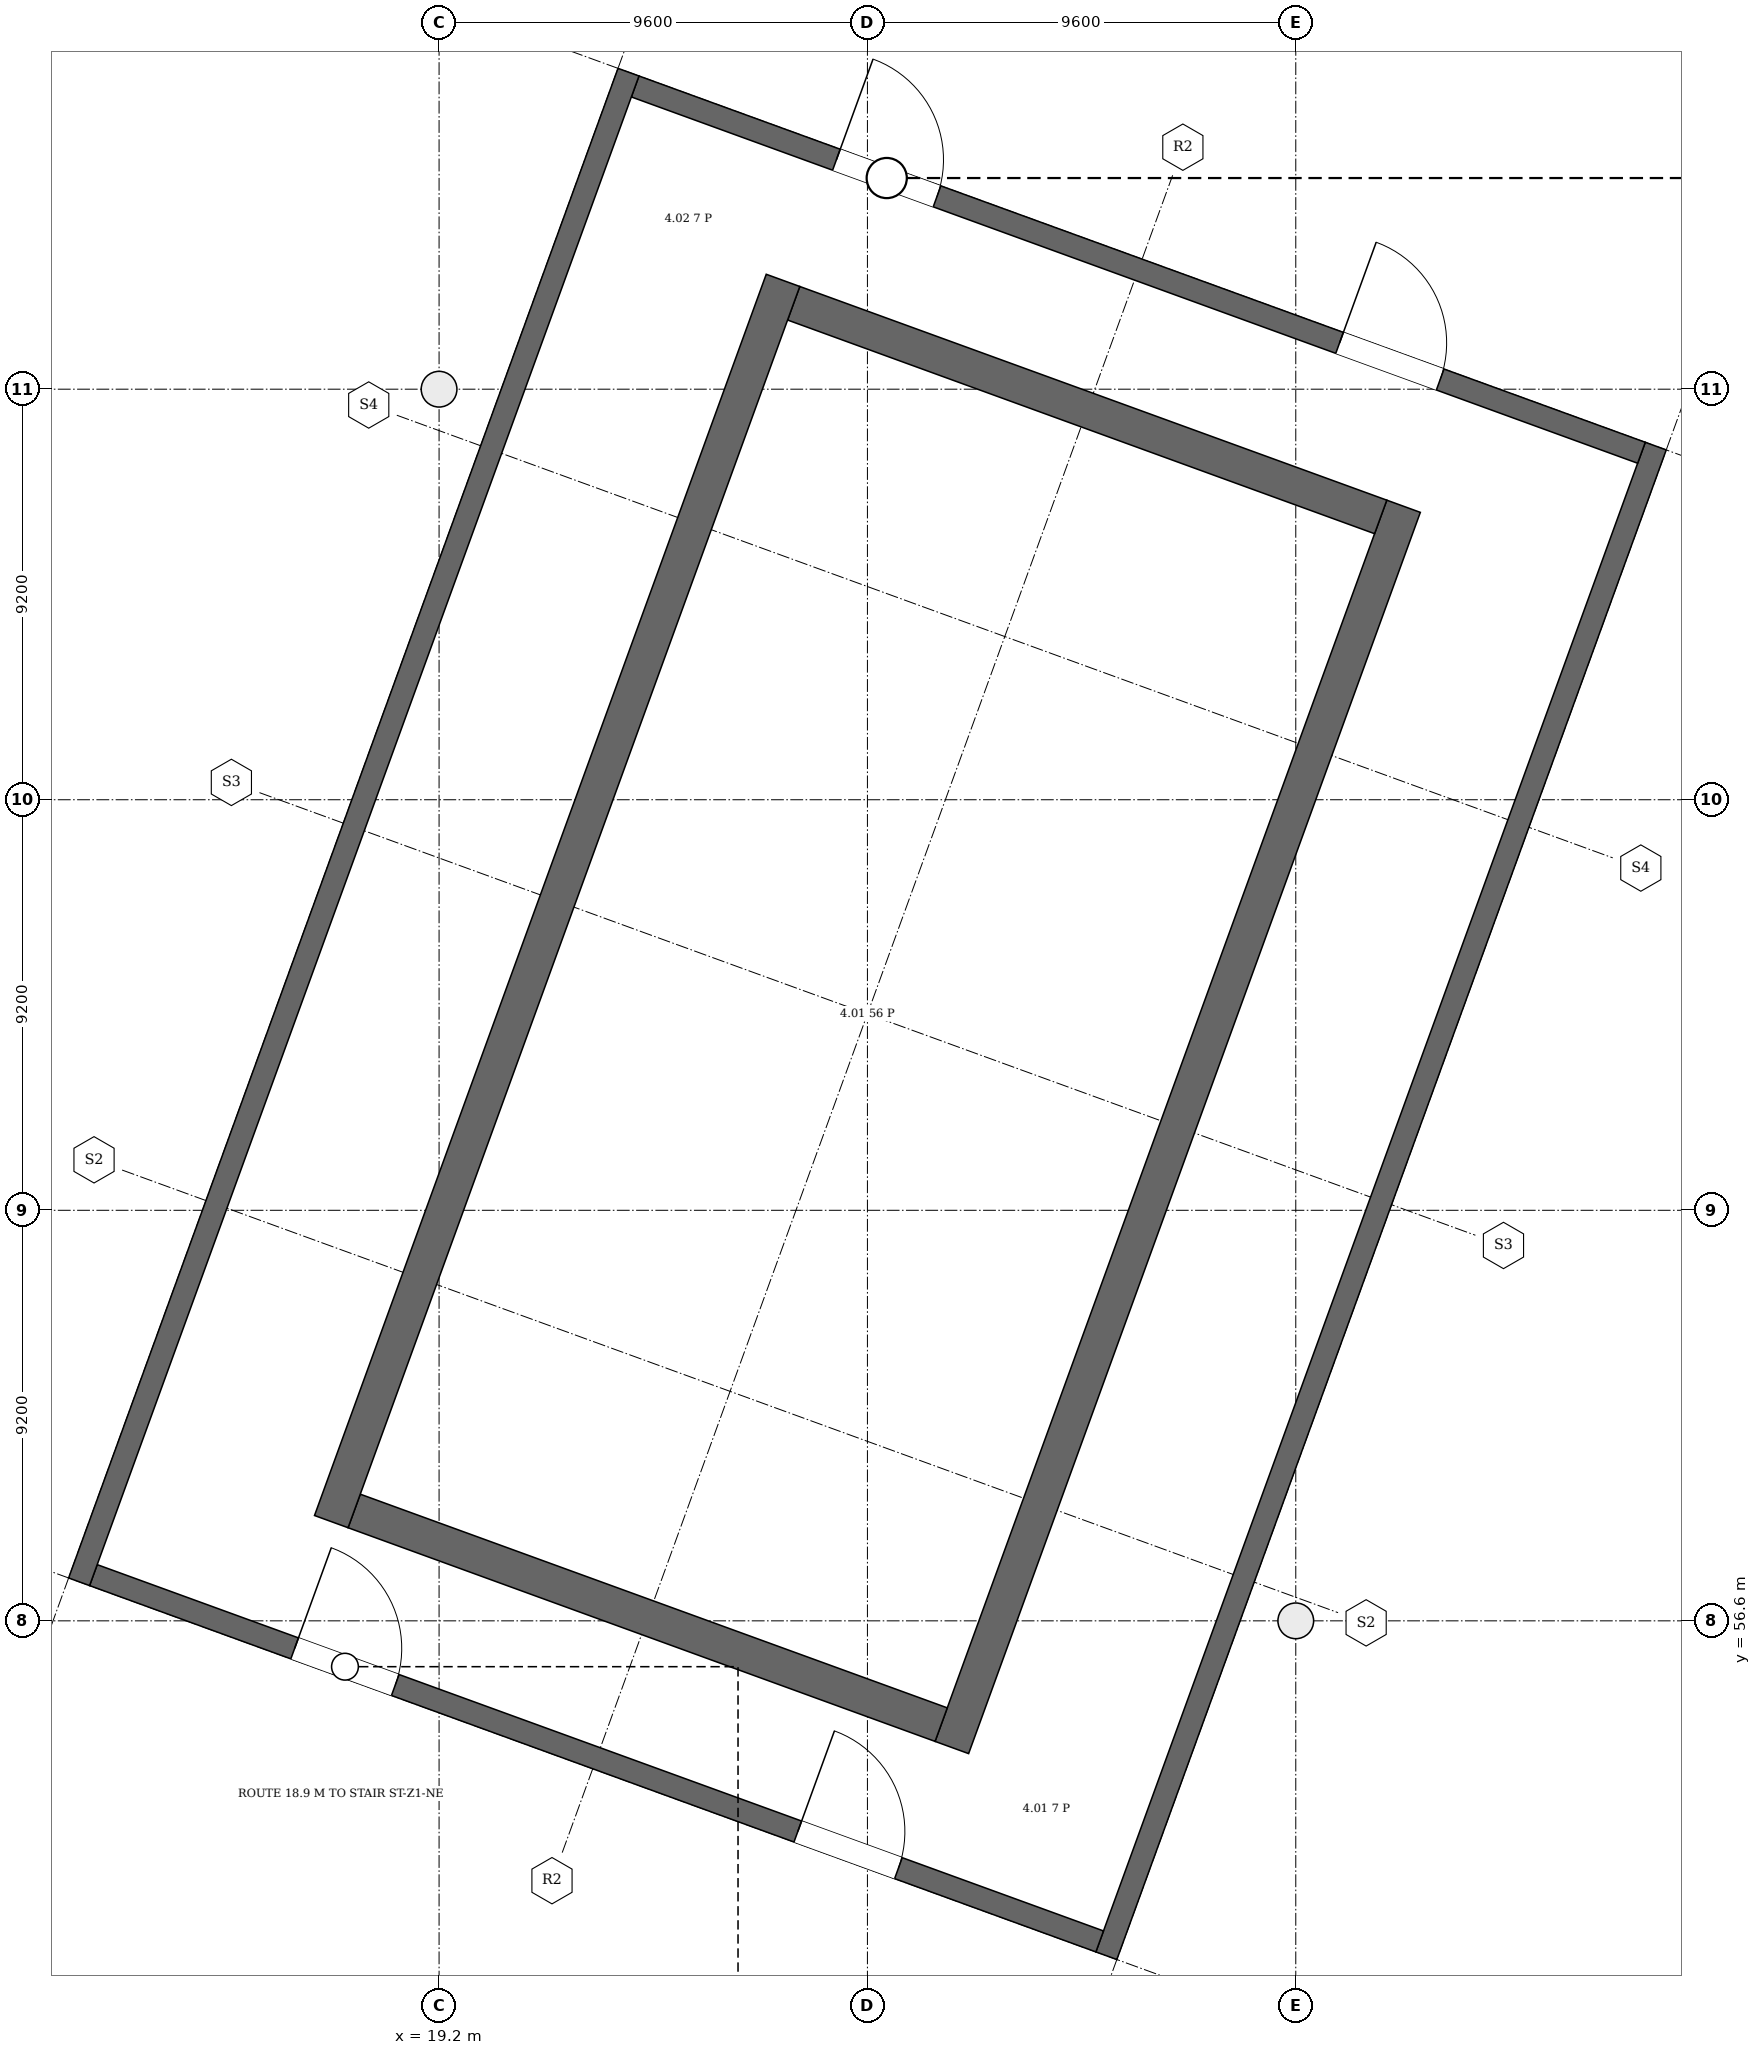
"""IFC4 building model, lengths in metres.
Left out: names, types, materials, properties, quantities, classifications, styles, units other than length and angle.
Written with IfcOpenShell. Run it as: python <this file> out.ifc"""

import sys

from ifc_helpers import new_model, si_unit, direction, frame, frame_2d, origin, origin_2d, place, context, subcontext, project, spatial, rectangle, circle, extrude, element, fill, save


model = new_model("IFC4")
c1 = context("Model", 3, precision=1e-05, world=origin(), true_north=direction((0.0, 1.0)))
c2 = subcontext(c1, "Body", "Model", "MODEL_VIEW")
j1 = project(units=[si_unit("LENGTHUNIT", "METRE"), si_unit("PLANEANGLEUNIT", "RADIAN")], contexts=[c1])
p1 = place(None, origin())
s1 = spatial("IfcSite", under=j1, at=p1, CompositionType="ELEMENT")
p2 = place(p1, origin())
s2 = spatial("IfcBuilding", under=s1, at=p2, CompositionType="ELEMENT")
p3 = place(p2, frame((0.0, 0.0, 26.7)))
s3 = spatial("IfcBuildingStorey", under=s2, at=p3, CompositionType="ELEMENT", Elevation=26.7)
p4 = place(p3, frame((11.132, 57.475, 0.0), z_axis=(0.0, 0.0, 1.0), x_axis=(0.342021295667, 0.939692201367, 0.0)))
e1 = element("IfcWall", 1, at=p4, inside=s3, PredefinedType="SHEAR", context=c2, shape_type="SweptSolid", body=[
    extrude(rectangle(XDim=36.0, YDim=0.5, at=frame_2d((18.0, 0.0))), origin(), (0.0, 0.0, 1.0), 5.2),
])
p5 = place(p3, frame((34.155, 49.096, 0.0), z_axis=(0.0, 0.0, 1.0), x_axis=(0.342019116079, 0.939692994673, 0.0)))
e2 = element("IfcWall", 2, at=p5, inside=s3, PredefinedType="SHEAR", context=c2, shape_type="SweptSolid", body=[
    extrude(rectangle(XDim=36.0, YDim=0.5, at=frame_2d((18.0, 0.0))), origin(), (0.0, 0.0, 1.0), 5.2),
])
p6 = place(p3, frame((11.453, 57.625, 0.0), z_axis=(0.0, 0.0, 1.0), x_axis=(0.939691804709, -0.342022385471, 0.0)))
e3 = element("IfcWall", 3, at=p6, inside=s3, PredefinedType="SHEAR", context=c2, shape_type="SweptSolid", body=[
    extrude(rectangle(XDim=24.0, YDim=0.5, at=frame_2d((12.0, 0.0))), origin(), (0.0, 0.0, 1.0), 5.2),
])
p7 = place(p6, frame((4.8, 0.0, 0.0)))
e4 = element("IfcOpeningElement", 4, at=p7, cuts=e3, PredefinedType="OPENING", context=c2, shape_type="SweptSolid", body=[
    extrude(rectangle(XDim=2.4, YDim=2.4, at=frame_2d((1.2, 1.2))), frame((0.0, 0.26, 0.0), z_axis=(0.0, -1.0, 0.0), x_axis=(1.0, 0.0, 0.0)), (0.0, 0.0, 1.0), 0.52),
])
p8 = place(p6, frame((16.8, 0.0, 0.0)))
e5 = element("IfcOpeningElement", 5, at=p8, cuts=e3, PredefinedType="OPENING", context=c2, shape_type="SweptSolid", body=[
    extrude(rectangle(XDim=2.4, YDim=2.4, at=frame_2d((1.2, 1.2))), frame((0.0, 0.26, 0.0), z_axis=(0.0, -1.0, 0.0), x_axis=(1.0, 0.0, 0.0)), (0.0, 0.0, 1.0), 0.52),
])
p9 = place(p3, frame((23.594, 90.984, 0.0), z_axis=(0.0, 0.0, 1.0), x_axis=(0.939692994673, -0.342019116079, 0.0)))
e6 = element("IfcWall", 6, at=p9, inside=s3, PredefinedType="SHEAR", context=c2, shape_type="SweptSolid", body=[
    extrude(rectangle(XDim=24.0, YDim=0.5, at=frame_2d((12.0, 0.0))), origin(), (0.0, 0.0, 1.0), 5.2),
])
p10 = place(p9, frame((4.8, 0.0, 0.0)))
e7 = element("IfcOpeningElement", 7, at=p10, cuts=e6, PredefinedType="OPENING", context=c2, shape_type="SweptSolid", body=[
    extrude(rectangle(XDim=2.4, YDim=2.4, at=frame_2d((1.2, 1.2))), frame((0.0, 0.26, 0.0), z_axis=(0.0, -1.0, 0.0), x_axis=(1.0, 0.0, 0.0)), (0.0, 0.0, 1.0), 0.52),
])
p11 = place(p9, frame((16.8, 0.0, 0.0)))
e8 = element("IfcOpeningElement", 8, at=p11, cuts=e6, PredefinedType="OPENING", context=c2, shape_type="SweptSolid", body=[
    extrude(rectangle(XDim=2.4, YDim=2.4, at=frame_2d((1.2, 1.2))), frame((0.0, 0.26, 0.0), z_axis=(0.0, -1.0, 0.0), x_axis=(1.0, 0.0, 0.0)), (0.0, 0.0, 1.0), 0.52),
])
p12 = place(p3, frame((16.784, 58.823, 0.0), z_axis=(0.0, 0.0, 1.0), x_axis=(0.342019205328, 0.939692962188, 0.0)))
e9 = element("IfcWall", 9, at=p12, inside=s3, PredefinedType="SOLIDWALL", context=c2, shape_type="SweptSolid", body=[
    extrude(rectangle(XDim=29.6, YDim=0.8, at=frame_2d((14.8, 0.0))), origin(), (0.0, 0.0, 1.0), 1.1),
])
p13 = place(p3, frame((30.692, 53.762, 0.0), z_axis=(0.0, 0.0, 1.0), x_axis=(0.342021856193, 0.939691997352, 0.0)))
e10 = element("IfcWall", 10, at=p13, inside=s3, PredefinedType="SOLIDWALL", context=c2, shape_type="SweptSolid", body=[
    extrude(rectangle(XDim=29.6, YDim=0.8, at=frame_2d((14.8, 0.0))), origin(), (0.0, 0.0, 1.0), 1.1),
])
p14 = place(p3, frame((17.297, 59.062, 0.0), z_axis=(0.0, 0.0, 1.0), x_axis=(0.939690020578, -0.342027287253, 0.0)))
e11 = element("IfcWall", 11, at=p14, inside=s3, PredefinedType="SOLIDWALL", context=c2, shape_type="SweptSolid", body=[
    extrude(rectangle(XDim=14.0, YDim=0.8, at=frame_2d((7.0, 0.0))), origin(), (0.0, 0.0, 1.0), 1.1),
])
p15 = place(p3, frame((27.147, 86.126, 0.0), z_axis=(0.0, 0.0, 1.0), x_axis=(0.939692060566, -0.342021682513, 0.0)))
e12 = element("IfcWall", 12, at=p15, inside=s3, PredefinedType="SOLIDWALL", context=c2, shape_type="SweptSolid", body=[
    extrude(rectangle(XDim=14.0, YDim=0.8, at=frame_2d((7.0, 0.0))), origin(), (0.0, 0.0, 1.0), 1.1),
])
for number, where, z_axis, x_axis in (
    (13, (38.4, 56.6, 0.0), (0.0, 0.0, 1.0), (1.0, 0.0, 0.0)),
    (14, (19.2, 84.2, 0.0), (0.0, 0.0, 1.0), (1.0, 0.0, 0.0)),
):
    element("IfcColumn", number, at=place(p3, frame(where, z_axis=z_axis, x_axis=x_axis)), inside=s3, PredefinedType="COLUMN", context=c2, shape_type="SweptSolid", body=[
        extrude(circle(Radius=0.4, at=origin_2d()), origin(), (0.0, 0.0, 1.0), 5.2),
    ])
p16 = place(p7, origin())
e15 = element("IfcDoor", 15, at=p16, inside=s3, OperationType="DOUBLE_DOOR_SINGLE_SWING", PredefinedType="DOOR", context=c2, shape_type="SweptSolid", body=[
    extrude(rectangle(XDim=2.4, YDim=2.4, at=frame_2d((1.2, 1.2))), frame((0.0, 0.025, 0.0), z_axis=(0.0, -1.0, 0.0), x_axis=(1.0, 0.0, 0.0)), (0.0, 0.0, 1.0), 0.05),
])
fill(e4, e15)
p17 = place(p10, origin())
e16 = element("IfcDoor", 16, at=p17, inside=s3, OperationType="DOUBLE_DOOR_SINGLE_SWING", PredefinedType="DOOR", context=c2, shape_type="SweptSolid", body=[
    extrude(rectangle(XDim=2.4, YDim=2.4, at=frame_2d((1.2, 1.2))), frame((0.0, 0.025, 0.0), z_axis=(0.0, -1.0, 0.0), x_axis=(1.0, 0.0, 0.0)), (0.0, 0.0, 1.0), 0.05),
])
fill(e7, e16)
p18 = place(p8, origin())
e17 = element("IfcDoor", 17, at=p18, inside=s3, OperationType="DOUBLE_DOOR_SINGLE_SWING", PredefinedType="DOOR", context=c2, shape_type="SweptSolid", body=[
    extrude(rectangle(XDim=2.4, YDim=2.4, at=frame_2d((1.2, 1.2))), frame((0.0, 0.025, 0.0), z_axis=(0.0, -1.0, 0.0), x_axis=(1.0, 0.0, 0.0)), (0.0, 0.0, 1.0), 0.05),
])
fill(e5, e17)
p19 = place(p11, origin())
e18 = element("IfcDoor", 18, at=p19, inside=s3, OperationType="DOUBLE_DOOR_SINGLE_SWING", PredefinedType="DOOR", context=c2, shape_type="SweptSolid", body=[
    extrude(rectangle(XDim=2.4, YDim=2.4, at=frame_2d((1.2, 1.2))), frame((0.0, 0.025, 0.0), z_axis=(0.0, -1.0, 0.0), x_axis=(1.0, 0.0, 0.0)), (0.0, 0.0, 1.0), 0.05),
])
fill(e8, e18)
save(model, sys.argv[1])
